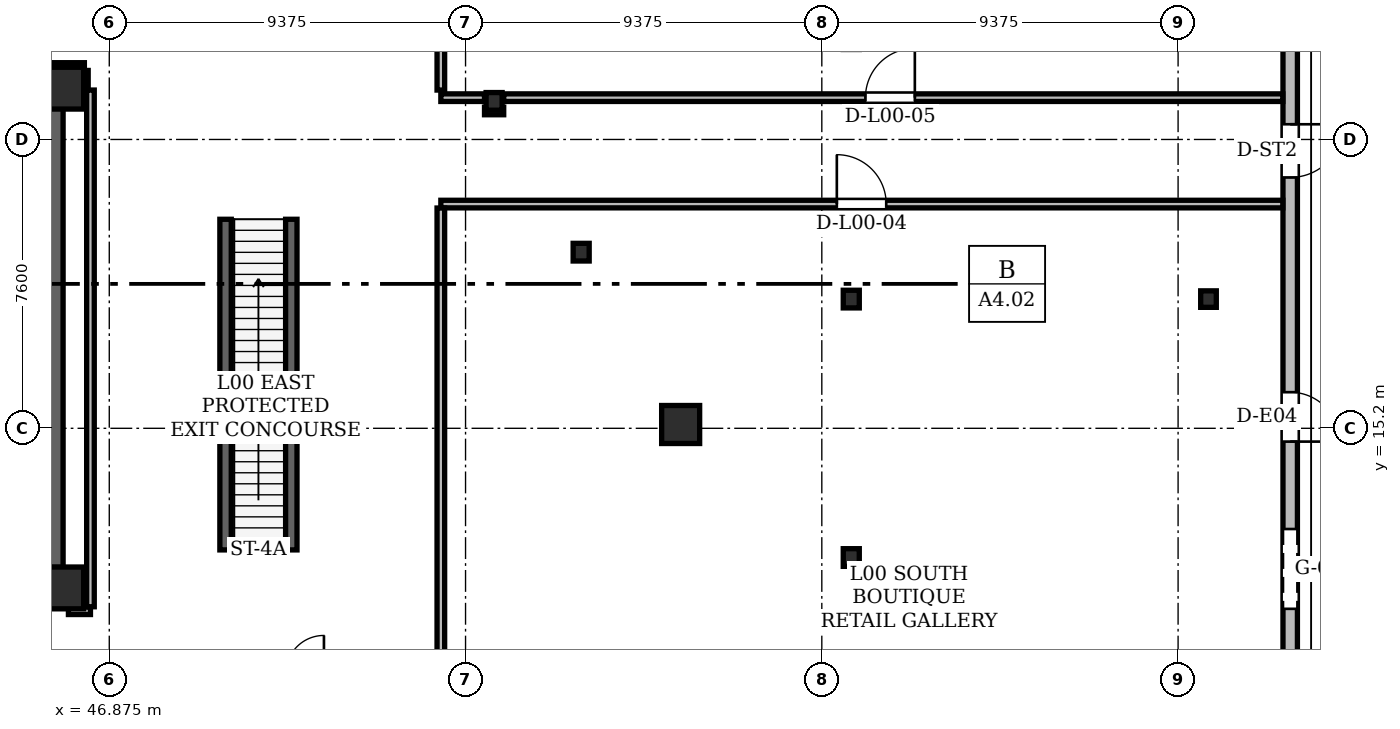
"""IFC4 building model, lengths in metres.
Left out: names, types, materials, properties, quantities, classifications, styles, units other than length and angle.
Written with IfcOpenShell. Run it as: python <this file> out.ifc"""

import sys

from ifc_helpers import new_model, si_unit, direction, frame, frame_2d, origin, origin_2d, place, context, subcontext, project, spatial, rectangle, hollow_rectangle, i_section, extrude, element, fill, save


model = new_model("IFC4")
c1 = context("Model", 3, precision=1e-05, world=origin(), true_north=direction((0.0, 1.0)))
c2 = subcontext(c1, "Body", "Model", "MODEL_VIEW")
j1 = project(units=[si_unit("LENGTHUNIT", "METRE"), si_unit("PLANEANGLEUNIT", "RADIAN")], contexts=[c1])
p1 = place(None, origin())
s1 = spatial("IfcSite", under=j1, at=p1, CompositionType="ELEMENT")
p2 = place(p1, origin())
s2 = spatial("IfcBuilding", under=s1, at=p2, CompositionType="ELEMENT")
p3 = place(p2, origin())
s3 = spatial("IfcBuildingStorey", under=s2, at=p3, CompositionType="ELEMENT", Elevation=0.0)
for number, where, z_axis, x_axis in (
    (1, (45.65, 11.0, 0.0), (0.0, 0.0, 1.0), (1.0, 0.0, 0.0)),
    (2, (45.65, 24.15, 0.0), (0.0, 0.0, 1.0), (1.0, 0.0, 0.0)),
):
    element("IfcColumn", number, at=place(p3, frame(where, z_axis=z_axis, x_axis=x_axis)), inside=s3, PredefinedType="COLUMN", context=c2, shape_type="SweptSolid", body=[
        extrude(hollow_rectangle(XDim=1.1, YDim=1.1, WallThickness=0.09, at=origin_2d()), origin(), (0.0, 0.0, 1.0), 5.4),
    ])
p4 = place(p3, frame((61.91, 15.3, 0.004), z_axis=(0.0, 0.0, 1.0), x_axis=(1.0, 0.0, 0.0)))
e3 = element("IfcColumn", 3, at=p4, inside=s3, PredefinedType="COLUMN", context=c2, shape_type="SweptSolid", body=[
    extrude(hollow_rectangle(XDim=1.0, YDim=1.0, WallThickness=0.085, at=origin_2d()), origin(), (0.0, 0.0, 1.0), 5.391),
])
for number, where, z_axis, x_axis in (
    (4, (59.292, 19.834, 0.004), (0.0, 0.0, 1.0), (1.0, 0.0, 0.0)),
    (5, (57.002, 23.802, 0.004), (0.0, 0.0, 1.0), (1.0, 0.0, 0.0)),
):
    element("IfcColumn", number, at=place(p3, frame(where, z_axis=z_axis, x_axis=x_axis)), inside=s3, PredefinedType="COLUMN", context=c2, shape_type="SweptSolid", body=[
        extrude(i_section(OverallWidth=0.422, OverallDepth=0.465, WebThickness=0.045, FlangeThickness=0.072, at=origin_2d()), origin(), (0.0, 0.0, 1.0), 5.391),
    ])
for number, where, z_axis, x_axis in (
    (6, (66.4, 11.8, 0.0), (0.0, 0.0, 1.0), (1.0, 0.0, 0.0)),
    (7, (66.4, 18.6, 0.0), (0.0, 0.0, 1.0), (1.0, 0.0, 0.0)),
):
    element("IfcColumn", number, at=place(p3, frame(where, z_axis=z_axis, x_axis=x_axis)), inside=s3, PredefinedType="COLUMN", context=c2, shape_type="SweptSolid", body=[
        extrude(i_section(OverallWidth=0.422, OverallDepth=0.465, WebThickness=0.045, FlangeThickness=0.072, at=origin_2d()), origin(), (0.0, 0.0, 1.0), 5.4),
    ])
p5 = place(p3, frame((75.8, 18.6, 0.0), z_axis=(0.0, 0.0, 1.0), x_axis=(1.0, 0.0, 0.0)))
e8 = element("IfcColumn", 8, at=p5, inside=s3, PredefinedType="COLUMN", context=c2, shape_type="SweptSolid", body=[
    extrude(i_section(OverallWidth=0.411, OverallDepth=0.434, WebThickness=0.036, FlangeThickness=0.057, at=origin_2d()), origin(), (0.0, 0.0, 1.0), 5.4),
])
p6 = place(p3, frame((45.36, 11.0, 0.0), z_axis=(0.0, 0.0, 1.0), x_axis=(0.0, 1.0, 0.0)))
e9 = element("IfcWall", 9, at=p6, inside=s3, PredefinedType="SHEAR", context=c2, shape_type="SweptSolid", body=[
    extrude(rectangle(XDim=13.3, YDim=0.6, at=frame_2d((6.65, 0.0))), origin(), (0.0, 0.0, 1.0), 5.12),
])
p7 = place(p3, frame((38.55, 11.24, 0.0), z_axis=(0.0, 0.0, 1.0), x_axis=(1.0, 0.0, 0.0)))
e10 = element("IfcWall", 10, at=p7, inside=s3, PredefinedType="SHEAR", context=c2, shape_type="SweptSolid", body=[
    extrude(rectangle(XDim=7.1, YDim=0.6, at=frame_2d((3.55, 0.0))), origin(), (0.0, 0.0, 1.0), 5.12),
])
for number, where, z_axis, x_axis in (
    (11, (49.935, 12.0, 0.0), (0.0, 0.0, 1.0), (0.0, 1.0, 0.0)),
    (12, (51.665, 12.0, 0.0), (0.0, 0.0, 1.0), (0.0, 1.0, 0.0)),
):
    element("IfcWall", number, at=place(p3, frame(where, z_axis=z_axis, x_axis=x_axis)), inside=s3, PredefinedType="SHEAR", context=c2, shape_type="SweptSolid", body=[
        extrude(rectangle(XDim=8.7, YDim=0.3, at=frame_2d((4.35, 0.0))), origin(), (0.0, 0.0, 1.0), 5.12),
    ])
p8 = place(p3, frame((77.95, 42.272, 0.0), z_axis=(0.0, 0.0, 1.0), x_axis=(0.0, -1.0, 0.0)))
e13 = element("IfcWall", 13, at=p8, inside=s3, PredefinedType="SOLIDWALL", context=c2, shape_type="SweptSolid", body=[
    extrude(rectangle(XDim=38.944, YDim=0.38, at=frame_2d((19.472, 0.0))), origin(), (0.0, 0.0, 1.0), 5.12),
])
p9 = place(p8, frame((26.122, 0.0, 0.0)))
e14 = element("IfcOpeningElement", 14, at=p9, cuts=e13, PredefinedType="OPENING", context=c2, shape_type="SweptSolid", body=[
    extrude(rectangle(XDim=1.3, YDim=2.25, at=frame_2d((0.65, 1.125))), frame((0.0, 0.19, 0.0), z_axis=(0.0, -1.0, 0.0), x_axis=(1.0, 0.0, 0.0)), (0.0, 0.0, 1.0), 0.38),
])
p10 = place(p8, frame((19.072, 0.0, 0.0)))
e15 = element("IfcOpeningElement", 15, at=p10, cuts=e13, PredefinedType="OPENING", context=c2, shape_type="SweptSolid", body=[
    extrude(rectangle(XDim=1.4, YDim=2.2, at=frame_2d((0.7, 1.1))), frame((0.0, 0.19, 0.0), z_axis=(0.0, -1.0, 0.0), x_axis=(1.0, 0.0, 0.0)), (0.0, 0.0, 1.0), 0.38),
])
p11 = place(p8, frame((29.722, 0.0, 0.0)))
e16 = element("IfcOpeningElement", 16, at=p11, cuts=e13, PredefinedType="OPENING", context=c2, shape_type="SweptSolid", body=[
    extrude(rectangle(XDim=2.1, YDim=2.3, at=frame_2d((1.05, 1.15))), frame((0.0, 0.19, 0.0), z_axis=(0.0, -1.0, 0.0), x_axis=(1.0, 0.0, 0.0)), (0.0, 0.0, 1.0), 0.38),
])
p12 = place(p8, frame((9.822, 0.0, 0.0)))
e17 = element("IfcOpeningElement", 17, at=p12, cuts=e13, PredefinedType="OPENING", context=c2, shape_type="SweptSolid", body=[
    extrude(rectangle(XDim=1.3, YDim=2.25, at=frame_2d((0.65, 1.125))), frame((0.0, 0.19, 0.0), z_axis=(0.0, -1.0, 0.0), x_axis=(1.0, 0.0, 0.0)), (0.0, 0.0, 1.0), 0.38),
])
p13 = place(p3, frame((45.8, 10.4, 0.0), z_axis=(0.0, 0.0, 1.0), x_axis=(1.0, 0.0, 0.0)))
e18 = element("IfcWall", 18, at=p13, inside=s3, PredefinedType="PARTITIONING", context=c2, shape_type="SweptSolid", body=[
    extrude(rectangle(XDim=0.58, YDim=0.2, at=frame_2d((0.29, 0.0))), origin(), (0.0, 0.0, 1.0), 4.183),
])
p14 = place(p3, frame((55.6, 21.1, 0.0), z_axis=(0.0, 0.0, 1.0), x_axis=(1.0, 0.0, 0.0)))
e19 = element("IfcWall", 19, at=p14, inside=s3, PredefinedType="PARTITIONING", context=c2, shape_type="SweptSolid", body=[
    extrude(rectangle(XDim=22.156, YDim=0.2, at=frame_2d((11.078, 0.0))), origin(), (0.0, 0.0, 1.0), 4.183),
])
p15 = place(p14, frame((10.42, 0.0, 0.0)))
e20 = element("IfcOpeningElement", 20, at=p15, cuts=e19, PredefinedType="OPENING", context=c2, shape_type="SweptSolid", body=[
    extrude(rectangle(XDim=1.3, YDim=2.2, at=frame_2d((0.65, 1.1))), frame((0.0, 0.1, 0.0), z_axis=(0.0, -1.0, 0.0), x_axis=(1.0, 0.0, 0.0)), (0.0, 0.0, 1.0), 0.2),
])
p16 = place(p3, frame((56.749, 23.55, 0.0), z_axis=(0.0, 0.0, 1.0), x_axis=(1.0, 0.0, 0.0)))
e21 = element("IfcWall", 21, at=p16, inside=s3, PredefinedType="PARTITIONING", context=c2, shape_type="SweptSolid", body=[
    extrude(rectangle(XDim=0.505, YDim=0.2, at=frame_2d((0.252, 0.0))), origin(), (0.0, 0.0, 1.0), 4.254),
])
p17 = place(p3, frame((55.6, 23.9, 0.0), z_axis=(0.0, 0.0, 1.0), x_axis=(1.0, 0.0, 0.0)))
e22 = element("IfcWall", 22, at=p17, inside=s3, PredefinedType="PARTITIONING", context=c2, shape_type="SweptSolid", body=[
    extrude(rectangle(XDim=1.149, YDim=0.2, at=frame_2d((0.575, 0.0))), origin(), (0.0, 0.0, 1.0), 5.12),
])
p18 = place(p3, frame((57.254, 23.9, 0.0), z_axis=(0.0, 0.0, 1.0), x_axis=(1.0, 0.0, 0.0)))
e23 = element("IfcWall", 23, at=p18, inside=s3, PredefinedType="PARTITIONING", context=c2, shape_type="SweptSolid", body=[
    extrude(rectangle(XDim=20.502, YDim=0.2, at=frame_2d((10.251, 0.0))), origin(), (0.0, 0.0, 1.0), 4.183),
])
p19 = place(p18, frame((9.519, 0.0, 0.0)))
e24 = element("IfcOpeningElement", 24, at=p19, cuts=e23, PredefinedType="OPENING", context=c2, shape_type="SweptSolid", body=[
    extrude(rectangle(XDim=1.3, YDim=2.2, at=frame_2d((0.65, 1.1))), frame((0.0, 0.1, 0.0), z_axis=(0.0, -1.0, 0.0), x_axis=(1.0, 0.0, 0.0)), (0.0, 0.0, 1.0), 0.2),
])
p20 = place(p3, frame((45.08, 24.72, 0.0), z_axis=(0.0, 0.0, 1.0), x_axis=(1.0, 0.0, 0.0)))
e25 = element("IfcWall", 25, at=p20, inside=s3, PredefinedType="PARTITIONING", context=c2, shape_type="SweptSolid", body=[
    extrude(rectangle(XDim=1.14, YDim=0.2, at=frame_2d((0.57, 0.0))), origin(), (0.0, 0.0, 1.0), 4.183),
])
p21 = place(p3, frame((46.22, 24.1, 0.0), z_axis=(0.0, 0.0, 1.0), x_axis=(0.0, 1.0, 0.0)))
e26 = element("IfcWall", 26, at=p21, inside=s3, PredefinedType="PARTITIONING", context=c2, shape_type="SweptSolid", body=[
    extrude(rectangle(XDim=0.516, YDim=0.2, at=frame_2d((0.258, 0.0))), origin(), (0.0, 0.0, 1.0), 5.12),
])
p22 = place(p3, frame((46.38, 10.504, 0.0), z_axis=(0.0, 0.0, 1.0), x_axis=(0.0, 1.0, 0.0)))
e27 = element("IfcWall", 27, at=p22, inside=s3, PredefinedType="PARTITIONING", context=c2, shape_type="SweptSolid", body=[
    extrude(rectangle(XDim=13.596, YDim=0.2, at=frame_2d((6.798, 0.0))), origin(), (0.0, 0.0, 1.0), 5.12),
])
p23 = place(p3, frame((55.6, 1.644, 0.0), z_axis=(0.0, 0.0, 1.0), x_axis=(0.0, 1.0, 0.0)))
e28 = element("IfcWall", 28, at=p23, inside=s3, PredefinedType="PARTITIONING", context=c2, shape_type="SweptSolid", body=[
    extrude(rectangle(XDim=19.352, YDim=0.2, at=frame_2d((9.676, 0.0))), origin(), (0.0, 0.0, 1.0), 4.254),
])
p24 = place(p3, frame((55.6, 24.1, 0.0), z_axis=(0.0, 0.0, 1.0), x_axis=(0.0, 1.0, 0.0)))
e29 = element("IfcWall", 29, at=p24, inside=s3, PredefinedType="PARTITIONING", context=c2, shape_type="SweptSolid", body=[
    extrude(rectangle(XDim=19.856, YDim=0.2, at=frame_2d((9.928, 0.0))), origin(), (0.0, 0.0, 1.0), 3.91),
])
p25 = place(p9, origin())
e30 = element("IfcDoor", 30, at=p25, inside=s3, OperationType="SINGLE_SWING_RIGHT", PredefinedType="DOOR", context=c2, shape_type="SweptSolid", body=[
    extrude(rectangle(XDim=1.3, YDim=2.25, at=frame_2d((0.65, 1.125))), frame((0.0, 0.025, 0.0), z_axis=(0.0, -1.0, 0.0), x_axis=(1.0, 0.0, 0.0)), (0.0, 0.0, 1.0), 0.05),
])
fill(e14, e30)
p26 = place(p10, origin())
e31 = element("IfcDoor", 31, at=p26, inside=s3, OperationType="SINGLE_SWING_LEFT", PredefinedType="DOOR", context=c2, shape_type="SweptSolid", body=[
    extrude(rectangle(XDim=1.4, YDim=2.2, at=frame_2d((0.7, 1.1))), frame((0.0, 0.025, 0.0), z_axis=(0.0, -1.0, 0.0), x_axis=(1.0, 0.0, 0.0)), (0.0, 0.0, 1.0), 0.05),
])
fill(e15, e31)
p27 = place(p11, origin())
e32 = element("IfcDoor", 32, at=p27, inside=s3, OperationType="SINGLE_SWING_RIGHT", PredefinedType="GATE", context=c2, shape_type="SweptSolid", body=[
    extrude(rectangle(XDim=2.1, YDim=2.3, at=frame_2d((1.05, 1.15))), frame((0.0, 0.025, 0.0), z_axis=(0.0, -1.0, 0.0), x_axis=(1.0, 0.0, 0.0)), (0.0, 0.0, 1.0), 0.05),
])
fill(e16, e32)
p28 = place(p15, origin())
e33 = element("IfcDoor", 33, at=p28, inside=s3, OperationType="SINGLE_SWING_LEFT", PredefinedType="DOOR", context=c2, shape_type="SweptSolid", body=[
    extrude(rectangle(XDim=1.3, YDim=2.2, at=frame_2d((0.65, 1.1))), frame((0.0, 0.025, 0.0), z_axis=(0.0, -1.0, 0.0), x_axis=(1.0, 0.0, 0.0)), (0.0, 0.0, 1.0), 0.05),
])
fill(e20, e33)
p29 = place(p19, origin())
e34 = element("IfcDoor", 34, at=p29, inside=s3, OperationType="SINGLE_SWING_RIGHT", PredefinedType="DOOR", context=c2, shape_type="SweptSolid", body=[
    extrude(rectangle(XDim=1.3, YDim=2.2, at=frame_2d((0.65, 1.1))), frame((0.0, 0.025, 0.0), z_axis=(0.0, -1.0, 0.0), x_axis=(1.0, 0.0, 0.0)), (0.0, 0.0, 1.0), 0.05),
])
fill(e24, e34)
save(model, sys.argv[1])
